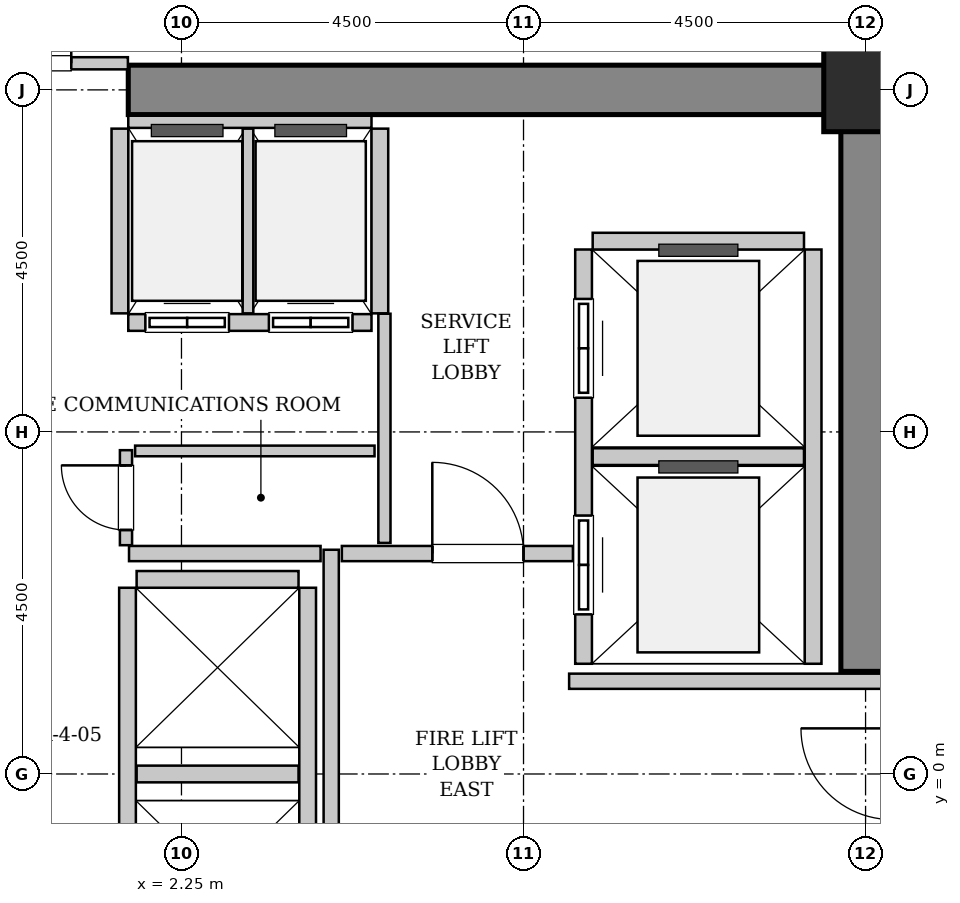
"""IFC4 building model, lengths in metres.
Left out: names, types, materials, properties, quantities, classifications, styles, units other than length and angle.
Written with IfcOpenShell. Run it as: python <this file> out.ifc"""

import sys

from ifc_helpers import new_model, si_unit, direction, frame, frame_2d, origin, origin_2d, place, context, subcontext, project, spatial, rectangle, hollow_rectangle, extrude, source, transform, mapped, element, fill, save


model = new_model("IFC4")
c1 = context("Model", 3, precision=1e-05, world=origin(), true_north=direction((0.0, 1.0)))
c2 = subcontext(c1, "Body", "Model", "MODEL_VIEW")
j1 = project(units=[si_unit("LENGTHUNIT", "METRE"), si_unit("PLANEANGLEUNIT", "RADIAN")], contexts=[c1])
p1 = place(None, origin())
s1 = spatial("IfcSite", under=j1, at=p1, CompositionType="ELEMENT")
p2 = place(p1, origin())
s2 = spatial("IfcBuilding", under=s1, at=p2, CompositionType="ELEMENT")
p3 = place(p2, frame((0.0, 0.0, 27.6)))
s3 = spatial("IfcBuildingStorey", under=s2, at=p3, CompositionType="ELEMENT", Elevation=27.6)
m1 = source(origin(), c2, "Body", "SweptSolid", [
    extrude(rectangle(XDim=10.025, YDim=0.65, at=frame_2d((5.012, 0.0))), origin(), (0.0, 0.0, 1.0), 5.4),
])
p4 = place(p3, frame((1.55, 9.0, 0.0), z_axis=(0.0, 0.0, 1.0), x_axis=(1.0, 0.0, 0.0)))
e1 = element("IfcWall", 1, at=p4, inside=s3, PredefinedType="SHEAR", context=c2, shape_type="MappedRepresentation", body=[
    mapped(m1, transform((0.0, 0.0, 0.0), x_axis=(1.0, 0.0, 0.0), y_axis=(0.0, 1.0, 0.0), z_axis=(0.0, 0.0, 1.0), scale=1.0)),
])
m2 = source(origin(), c2, "Body", "SweptSolid", [
    extrude(rectangle(XDim=7.325, YDim=0.65, at=frame_2d((3.663, 0.0))), origin(), (0.0, 0.0, 1.0), 5.4),
])
p5 = place(p3, frame((11.25, 1.35, 0.0), z_axis=(0.0, 0.0, 1.0), x_axis=(0.0, 1.0, 0.0)))
e2 = element("IfcWall", 2, at=p5, inside=s3, PredefinedType="SHEAR", context=c2, shape_type="MappedRepresentation", body=[
    mapped(m2, transform((0.0, 0.0, 0.0), x_axis=(1.0, 0.0, 0.0), y_axis=(0.0, 1.0, 0.0), z_axis=(0.0, 0.0, 1.0), scale=1.0)),
])
m3 = source(origin(), c2, "Body", "SweptSolid", [
    extrude(hollow_rectangle(XDim=1.1, YDim=1.1, WallThickness=0.055, InnerFilletRadius=0.055, OuterFilletRadius=0.11, at=origin_2d()), origin(), (0.0, 0.0, 1.0), 5.4),
])
p6 = place(p3, frame((11.25, 9.0, 0.0), z_axis=(0.0, 0.0, 1.0), x_axis=(1.0, 0.0, 0.0)))
e3 = element("IfcColumn", 3, at=p6, inside=s3, PredefinedType="COLUMN", context=c2, shape_type="MappedRepresentation", body=[
    mapped(m3, transform((0.0, 0.0, 0.0), x_axis=(1.0, 0.0, 0.0), y_axis=(0.0, 1.0, 0.0), z_axis=(0.0, 0.0, 1.0), scale=1.0)),
])
m4 = source(origin(), c2, "Body", "SweptSolid", [
    extrude(rectangle(XDim=5.45, YDim=0.22, at=frame_2d((2.725, 0.0))), origin(), (0.0, 0.0, 1.0), 5.135),
])
p7 = place(p3, frame((7.54, 6.9, 0.0), z_axis=(0.0, 0.0, 1.0), x_axis=(0.0, -1.0, 0.0)))
e4 = element("IfcWall", 4, at=p7, inside=s3, PredefinedType="SOLIDWALL", context=c2, shape_type="MappedRepresentation", body=[
    mapped(m4, transform((0.0, 0.0, 0.0), x_axis=(1.0, 0.0, 0.0), y_axis=(0.0, 1.0, 0.0), z_axis=(0.0, 0.0, 1.0), scale=1.0)),
])
p8 = place(p7, frame((3.5, 0.0, 0.0)))
e5 = element("IfcOpeningElement", 5, at=p8, cuts=e4, PredefinedType="OPENING", context=c2, shape_type="SweptSolid", body=[
    extrude(rectangle(XDim=1.3, YDim=2.3, at=frame_2d((0.65, 1.15))), frame((0.0, 0.12, 0.0), z_axis=(0.0, -1.0, 0.0), x_axis=(1.0, 0.0, 0.0)), (0.0, 0.0, 1.0), 0.24),
])
p9 = place(p7, frame((0.65, 0.0, 0.0)))
e6 = element("IfcOpeningElement", 6, at=p9, cuts=e4, PredefinedType="OPENING", context=c2, shape_type="SweptSolid", body=[
    extrude(rectangle(XDim=1.3, YDim=2.3, at=frame_2d((0.65, 1.15))), frame((0.0, 0.12, 0.0), z_axis=(0.0, -1.0, 0.0), x_axis=(1.0, 0.0, 0.0)), (0.0, 0.0, 1.0), 0.24),
])
p10 = place(p3, frame((10.56, 1.45, 0.0), z_axis=(0.0, 0.0, 1.0), x_axis=(0.0, 1.0, 0.0)))
e7 = element("IfcWall", 7, at=p10, inside=s3, PredefinedType="SOLIDWALL", context=c2, shape_type="MappedRepresentation", body=[
    mapped(m4, transform((0.0, 0.0, 0.0), x_axis=(1.0, 0.0, 0.0), y_axis=(0.0, 1.0, 0.0), z_axis=(0.0, 0.0, 1.0), scale=1.0)),
])
m5 = source(origin(), c2, "Body", "SweptSolid", [
    extrude(rectangle(XDim=2.78, YDim=0.22, at=frame_2d((1.39, 0.0))), origin(), (0.0, 0.0, 1.0), 5.135),
])
for number, where, z_axis, x_axis in (
    (8, (7.66, 4.175, 0.0), (0.0, 0.0, 1.0), (1.0, 0.0, 0.0)),
    (9, (10.44, 7.01, 0.0), (0.0, 0.0, 1.0), (-1.0, 0.0, 0.0)),
):
    element("IfcWall", number, at=place(p3, frame(where, z_axis=z_axis, x_axis=x_axis)), inside=s3, PredefinedType="SOLIDWALL", context=c2, shape_type="MappedRepresentation", body=[
        mapped(m5, transform((0.0, 0.0, 0.0), x_axis=(1.0, 0.0, 0.0), y_axis=(0.0, 1.0, 0.0), z_axis=(0.0, 0.0, 1.0), scale=1.0)),
    ])
m6 = source(origin(), c2, "Body", "SweptSolid", [
    extrude(rectangle(XDim=3.2, YDim=0.22, at=frame_2d((1.6, 0.0))), origin(), (0.0, 0.0, 1.0), 5.135),
])
p11 = place(p3, frame((1.55, 5.94, 0.0), z_axis=(0.0, 0.0, 1.0), x_axis=(1.0, 0.0, 0.0)))
e10 = element("IfcWall", 10, at=p11, inside=s3, PredefinedType="SOLIDWALL", context=c2, shape_type="MappedRepresentation", body=[
    mapped(m6, transform((0.0, 0.0, 0.0), x_axis=(1.0, 0.0, 0.0), y_axis=(0.0, 1.0, 0.0), z_axis=(0.0, 0.0, 1.0), scale=1.0)),
])
p12 = place(p11, frame((0.225, 0.0, 0.0)))
e11 = element("IfcOpeningElement", 11, at=p12, cuts=e10, PredefinedType="OPENING", context=c2, shape_type="SweptSolid", body=[
    extrude(rectangle(XDim=1.1, YDim=2.2, at=frame_2d((0.55, 1.1))), frame((0.0, 0.12, 0.0), z_axis=(0.0, -1.0, 0.0), x_axis=(1.0, 0.0, 0.0)), (0.0, 0.0, 1.0), 0.24),
])
p13 = place(p11, frame((1.85, 0.0, 0.0)))
e12 = element("IfcOpeningElement", 12, at=p13, cuts=e10, PredefinedType="OPENING", context=c2, shape_type="SweptSolid", body=[
    extrude(rectangle(XDim=1.1, YDim=2.2, at=frame_2d((0.55, 1.1))), frame((0.0, 0.12, 0.0), z_axis=(0.0, -1.0, 0.0), x_axis=(1.0, 0.0, 0.0)), (0.0, 0.0, 1.0), 0.24),
])
m7 = source(origin(), c2, "Body", "SweptSolid", [
    extrude(rectangle(XDim=3.2, YDim=0.16, at=frame_2d((1.6, 0.0))), origin(), (0.0, 0.0, 1.0), 4.025),
])
p14 = place(p3, frame((4.75, 8.58, 0.0), z_axis=(0.0, 0.0, 1.0), x_axis=(-1.0, 0.0, 0.0)))
e13 = element("IfcWall", 13, at=p14, inside=s3, PredefinedType="PARTITIONING", context=c2, shape_type="MappedRepresentation", body=[
    mapped(m7, transform((0.0, 0.0, 0.0), x_axis=(1.0, 0.0, 0.0), y_axis=(0.0, 1.0, 0.0), z_axis=(0.0, 0.0, 1.0), scale=1.0)),
])
m8 = source(origin(), c2, "Body", "SweptSolid", [
    extrude(rectangle(XDim=2.43, YDim=0.22, at=frame_2d((1.215, 0.0))), origin(), (0.0, 0.0, 1.0), 5.135),
])
p15 = place(p3, frame((1.44, 8.49, 0.0), z_axis=(0.0, 0.0, 1.0), x_axis=(0.0, -1.0, 0.0)))
e14 = element("IfcWall", 14, at=p15, inside=s3, PredefinedType="SOLIDWALL", context=c2, shape_type="MappedRepresentation", body=[
    mapped(m8, transform((0.0, 0.0, 0.0), x_axis=(1.0, 0.0, 0.0), y_axis=(0.0, 1.0, 0.0), z_axis=(0.0, 0.0, 1.0), scale=1.0)),
])
m9 = source(origin(), c2, "Body", "SweptSolid", [
    extrude(rectangle(XDim=2.43, YDim=0.14, at=frame_2d((1.215, 0.0))), origin(), (0.0, 0.0, 1.0), 5.135),
])
p16 = place(p3, frame((3.125, 6.06, 0.0), z_axis=(0.0, 0.0, 1.0), x_axis=(0.0, 1.0, 0.0)))
e15 = element("IfcWall", 15, at=p16, inside=s3, PredefinedType="PARTITIONING", context=c2, shape_type="MappedRepresentation", body=[
    mapped(m9, transform((0.0, 0.0, 0.0), x_axis=(1.0, 0.0, 0.0), y_axis=(0.0, 1.0, 0.0), z_axis=(0.0, 0.0, 1.0), scale=1.0)),
])
p17 = place(p3, frame((4.86, 6.06, 0.0), z_axis=(0.0, 0.0, 1.0), x_axis=(0.0, 1.0, 0.0)))
e16 = element("IfcWall", 16, at=p17, inside=s3, PredefinedType="SOLIDWALL", context=c2, shape_type="MappedRepresentation", body=[
    mapped(m8, transform((0.0, 0.0, 0.0), x_axis=(1.0, 0.0, 0.0), y_axis=(0.0, 1.0, 0.0), z_axis=(0.0, 0.0, 1.0), scale=1.0)),
])
m10 = source(origin(), c2, "Body", "SweptSolid", [
    extrude(rectangle(XDim=4.9, YDim=0.22, at=frame_2d((2.45, 0.0))), origin(), (0.0, 0.0, 1.0), 5.135),
])
for number, where, z_axis, x_axis in (
    (17, (1.54, 2.45, 0.0), (0.0, 0.0, 1.0), (0.0, -1.0, 0.0)),
    (18, (3.91, -2.45, 0.0), (0.0, 0.0, 1.0), (0.0, 1.0, 0.0)),
):
    element("IfcWall", number, at=place(p3, frame(where, z_axis=z_axis, x_axis=x_axis)), inside=s3, PredefinedType="SOLIDWALL", context=c2, shape_type="MappedRepresentation", body=[
        mapped(m10, transform((0.0, 0.0, 0.0), x_axis=(1.0, 0.0, 0.0), y_axis=(0.0, 1.0, 0.0), z_axis=(0.0, 0.0, 1.0), scale=1.0)),
    ])
m11 = source(origin(), c2, "Body", "SweptSolid", [
    extrude(rectangle(XDim=2.13, YDim=0.22, at=frame_2d((1.065, 0.0))), origin(), (0.0, 0.0, 1.0), 5.135),
])
for number, where, z_axis, x_axis in (
    (19, (1.66, 0.0, 0.0), (0.0, 0.0, 1.0), (1.0, 0.0, 0.0)),
    (20, (3.79, 2.56, 0.0), (0.0, 0.0, 1.0), (-1.0, 0.0, 0.0)),
):
    element("IfcWall", number, at=place(p3, frame(where, z_axis=z_axis, x_axis=x_axis)), inside=s3, PredefinedType="SOLIDWALL", context=c2, shape_type="MappedRepresentation", body=[
        mapped(m11, transform((0.0, 0.0, 0.0), x_axis=(1.0, 0.0, 0.0), y_axis=(0.0, 1.0, 0.0), z_axis=(0.0, 0.0, 1.0), scale=1.0)),
    ])
m12 = source(origin(), c2, "Body", "SweptSolid", [
    extrude(rectangle(XDim=5.9, YDim=0.2, at=frame_2d((2.95, 0.0))), origin(), (0.0, 0.0, 1.0), 5.135),
])
p18 = place(p3, frame((4.22, -2.95, 0.0), z_axis=(0.0, 0.0, 1.0), x_axis=(0.0, 1.0, 0.0)))
e21 = element("IfcWall", 21, at=p18, inside=s3, PredefinedType="PARTITIONING", context=c2, shape_type="MappedRepresentation", body=[
    mapped(m12, transform((0.0, 0.0, 0.0), x_axis=(1.0, 0.0, 0.0), y_axis=(0.0, 1.0, 0.0), z_axis=(0.0, 0.0, 1.0), scale=1.0)),
])
m13 = source(origin(), c2, "Body", "SweptSolid", [
    extrude(rectangle(XDim=2.52, YDim=0.2, at=frame_2d((1.26, 0.0))), origin(), (0.0, 0.0, 1.0), 5.135),
])
p19 = place(p3, frame((1.56, 2.9, 0.0), z_axis=(0.0, 0.0, 1.0), x_axis=(1.0, 0.0, 0.0)))
e22 = element("IfcWall", 22, at=p19, inside=s3, PredefinedType="PARTITIONING", context=c2, shape_type="MappedRepresentation", body=[
    mapped(m13, transform((0.0, 0.0, 0.0), x_axis=(1.0, 0.0, 0.0), y_axis=(0.0, 1.0, 0.0), z_axis=(0.0, 0.0, 1.0), scale=1.0)),
])
m14 = source(origin(), c2, "Body", "SweptSolid", [
    extrude(rectangle(XDim=3.04, YDim=0.2, at=frame_2d((1.52, 0.0))), origin(), (0.0, 0.0, 1.0), 5.135),
])
p20 = place(p3, frame((4.36, 2.9, 0.0), z_axis=(0.0, 0.0, 1.0), x_axis=(1.0, 0.0, 0.0)))
e23 = element("IfcWall", 23, at=p20, inside=s3, PredefinedType="PARTITIONING", context=c2, shape_type="MappedRepresentation", body=[
    mapped(m14, transform((0.0, 0.0, 0.0), x_axis=(1.0, 0.0, 0.0), y_axis=(0.0, 1.0, 0.0), z_axis=(0.0, 0.0, 1.0), scale=1.0)),
])
p21 = place(p20, frame((1.19, 0.0, 0.0)))
e24 = element("IfcOpeningElement", 24, at=p21, cuts=e23, PredefinedType="OPENING", context=c2, shape_type="SweptSolid", body=[
    extrude(rectangle(XDim=1.2, YDim=2.15, at=frame_2d((0.6, 1.075))), frame((0.0, 0.11, 0.0), z_axis=(0.0, -1.0, 0.0), x_axis=(1.0, 0.0, 0.0)), (0.0, 0.0, 1.0), 0.22),
])
m15 = source(origin(), c2, "Body", "SweptSolid", [
    extrude(rectangle(XDim=4.11, YDim=0.2, at=frame_2d((2.055, 0.0))), origin(), (0.0, 0.0, 1.0), 5.135),
])
p22 = place(p3, frame((7.35, 1.22, 0.0), z_axis=(0.0, 0.0, 1.0), x_axis=(1.0, 0.0, 0.0)))
e25 = element("IfcWall", 25, at=p22, inside=s3, PredefinedType="PARTITIONING", context=c2, shape_type="MappedRepresentation", body=[
    mapped(m15, transform((0.0, 0.0, 0.0), x_axis=(1.0, 0.0, 0.0), y_axis=(0.0, 1.0, 0.0), z_axis=(0.0, 0.0, 1.0), scale=1.0)),
])
m16 = source(origin(), c2, "Body", "SweptSolid", [
    extrude(rectangle(XDim=3.09, YDim=0.16, at=frame_2d((1.545, 0.0))), origin(), (0.0, 0.0, 1.0), 4.025),
])
p23 = place(p3, frame((-1.545, 9.35, 0.0), z_axis=(0.0, 0.0, 1.0), x_axis=(1.0, 0.0, 0.0)))
e26 = element("IfcWall", 26, at=p23, inside=s3, PredefinedType="PARTITIONING", context=c2, shape_type="MappedRepresentation", body=[
    mapped(m16, transform((0.0, 0.0, 0.0), x_axis=(1.0, 0.0, 0.0), y_axis=(0.0, 1.0, 0.0), z_axis=(0.0, 0.0, 1.0), scale=1.0)),
])
p24 = place(p23, frame((0.745, 0.0, 0.0)))
e27 = element("IfcOpeningElement", 27, at=p24, cuts=e26, PredefinedType="OPENING", context=c2, shape_type="SweptSolid", body=[
    extrude(rectangle(XDim=1.6, YDim=2.3, at=frame_2d((0.8, 1.15))), frame((0.0, 0.09, 0.0), z_axis=(0.0, -1.0, 0.0), x_axis=(1.0, 0.0, 0.0)), (0.0, 0.0, 1.0), 0.18),
])
m17 = source(origin(), c2, "Body", "SweptSolid", [
    extrude(rectangle(XDim=3.015, YDim=0.16, at=frame_2d((1.507, 0.0))), origin(), (0.0, 0.0, 1.0), 5.135),
])
p25 = place(p3, frame((4.92, 3.04, 0.0), z_axis=(0.0, 0.0, 1.0), x_axis=(0.0, 1.0, 0.0)))
e28 = element("IfcWall", 28, at=p25, inside=s3, PredefinedType="PARTITIONING", context=c2, shape_type="MappedRepresentation", body=[
    mapped(m17, transform((0.0, 0.0, 0.0), x_axis=(1.0, 0.0, 0.0), y_axis=(0.0, 1.0, 0.0), z_axis=(0.0, 0.0, 1.0), scale=1.0)),
])
m18 = source(origin(), c2, "Body", "SweptSolid", [
    extrude(rectangle(XDim=1.25, YDim=0.16, at=frame_2d((0.625, 0.0))), origin(), (0.0, 0.0, 1.0), 5.135),
])
p26 = place(p3, frame((1.52, 3.01, 0.0), z_axis=(0.0, 0.0, 1.0), x_axis=(0.0, 1.0, 0.0)))
e29 = element("IfcWall", 29, at=p26, inside=s3, PredefinedType="PARTITIONING", context=c2, shape_type="MappedRepresentation", body=[
    mapped(m18, transform((0.0, 0.0, 0.0), x_axis=(1.0, 0.0, 0.0), y_axis=(0.0, 1.0, 0.0), z_axis=(0.0, 0.0, 1.0), scale=1.0)),
])
p27 = place(p26, frame((0.2, 0.0, 0.0)))
e30 = element("IfcOpeningElement", 30, at=p27, cuts=e29, PredefinedType="OPENING", context=c2, shape_type="SweptSolid", body=[
    extrude(rectangle(XDim=0.85, YDim=2.1, at=frame_2d((0.425, 1.05))), frame((0.0, 0.09, 0.0), z_axis=(0.0, -1.0, 0.0), x_axis=(1.0, 0.0, 0.0)), (0.0, 0.0, 1.0), 0.18),
])
m19 = source(origin(), c2, "Body", "SweptSolid", [
    extrude(rectangle(XDim=3.15, YDim=0.14, at=frame_2d((1.575, 0.0))), origin(), (0.0, 0.0, 1.0), 5.135),
])
p28 = place(p3, frame((1.64, 4.25, 0.0), z_axis=(0.0, 0.0, 1.0), x_axis=(1.0, 0.0, 0.0)))
e31 = element("IfcWall", 31, at=p28, inside=s3, PredefinedType="PARTITIONING", context=c2, shape_type="MappedRepresentation", body=[
    mapped(m19, transform((0.0, 0.0, 0.0), x_axis=(1.0, 0.0, 0.0), y_axis=(0.0, 1.0, 0.0), z_axis=(0.0, 0.0, 1.0), scale=1.0)),
])
m20 = source(origin(), c2, "Body", "SweptSolid", [
    extrude(rectangle(XDim=1.3, YDim=2.3, at=frame_2d((0.65, 1.15))), frame((0.0, 0.025, 0.0), z_axis=(0.0, -1.0, 0.0), x_axis=(1.0, 0.0, 0.0)), (0.0, 0.0, 1.0), 0.05),
])
p29 = place(p8, origin())
e32 = element("IfcDoor", 32, at=p29, inside=s3, OperationType="SLIDING_TO_RIGHT", PredefinedType="DOOR", context=c2, shape_type="MappedRepresentation", body=[
    mapped(m20, transform((0.0, 0.0, 0.0), x_axis=(1.0, 0.0, 0.0), y_axis=(0.0, 1.0, 0.0), z_axis=(0.0, 0.0, 1.0), scale=1.0)),
])
fill(e5, e32)
p30 = place(p9, origin())
e33 = element("IfcDoor", 33, at=p30, inside=s3, OperationType="SLIDING_TO_RIGHT", PredefinedType="DOOR", context=c2, shape_type="MappedRepresentation", body=[
    mapped(m20, transform((0.0, 0.0, 0.0), x_axis=(1.0, 0.0, 0.0), y_axis=(0.0, 1.0, 0.0), z_axis=(0.0, 0.0, 1.0), scale=1.0)),
])
fill(e6, e33)
m21 = source(origin(), c2, "Body", "SweptSolid", [
    extrude(rectangle(XDim=1.1, YDim=2.2, at=frame_2d((0.55, 1.1))), frame((0.0, 0.025, 0.0), z_axis=(0.0, -1.0, 0.0), x_axis=(1.0, 0.0, 0.0)), (0.0, 0.0, 1.0), 0.05),
])
p31 = place(p12, origin())
e34 = element("IfcDoor", 34, at=p31, inside=s3, OperationType="DOUBLE_DOOR_SLIDING", PredefinedType="DOOR", context=c2, shape_type="MappedRepresentation", body=[
    mapped(m21, transform((0.0, 0.0, 0.0), x_axis=(1.0, 0.0, 0.0), y_axis=(0.0, 1.0, 0.0), z_axis=(0.0, 0.0, 1.0), scale=1.0)),
])
fill(e11, e34)
p32 = place(p13, origin())
e35 = element("IfcDoor", 35, at=p32, inside=s3, OperationType="DOUBLE_DOOR_SLIDING", PredefinedType="DOOR", context=c2, shape_type="MappedRepresentation", body=[
    mapped(m21, transform((0.0, 0.0, 0.0), x_axis=(1.0, 0.0, 0.0), y_axis=(0.0, 1.0, 0.0), z_axis=(0.0, 0.0, 1.0), scale=1.0)),
])
fill(e12, e35)
m22 = source(origin(), c2, "Body", "SweptSolid", [
    extrude(rectangle(XDim=1.2, YDim=2.15, at=frame_2d((0.6, 1.075))), frame((0.0, 0.025, 0.0), z_axis=(0.0, -1.0, 0.0), x_axis=(1.0, 0.0, 0.0)), (0.0, 0.0, 1.0), 0.05),
])
p33 = place(p21, origin())
e36 = element("IfcDoor", 36, at=p33, inside=s3, OperationType="SINGLE_SWING_LEFT", PredefinedType="DOOR", context=c2, shape_type="MappedRepresentation", body=[
    mapped(m22, transform((0.0, 0.0, 0.0), x_axis=(1.0, 0.0, 0.0), y_axis=(0.0, 1.0, 0.0), z_axis=(0.0, 0.0, 1.0), scale=1.0)),
])
fill(e24, e36)
m23 = source(origin(), c2, "Body", "SweptSolid", [
    extrude(rectangle(XDim=1.6, YDim=2.3, at=frame_2d((0.8, 1.15))), frame((0.0, 0.025, 0.0), z_axis=(0.0, -1.0, 0.0), x_axis=(1.0, 0.0, 0.0)), (0.0, 0.0, 1.0), 0.05),
])
p34 = place(p24, origin())
e37 = element("IfcDoor", 37, at=p34, inside=s3, OperationType="DOUBLE_DOOR_SINGLE_SWING", PredefinedType="DOOR", context=c2, shape_type="MappedRepresentation", body=[
    mapped(m23, transform((0.0, 0.0, 0.0), x_axis=(1.0, 0.0, 0.0), y_axis=(0.0, 1.0, 0.0), z_axis=(0.0, 0.0, 1.0), scale=1.0)),
])
fill(e27, e37)
m24 = source(origin(), c2, "Body", "SweptSolid", [
    extrude(rectangle(XDim=0.85, YDim=2.1, at=frame_2d((0.425, 1.05))), frame((0.0, 0.025, 0.0), z_axis=(0.0, -1.0, 0.0), x_axis=(1.0, 0.0, 0.0)), (0.0, 0.0, 1.0), 0.05),
])
p35 = place(p27, origin())
e38 = element("IfcDoor", 38, at=p35, inside=s3, OperationType="SINGLE_SWING_RIGHT", PredefinedType="DOOR", context=c2, shape_type="MappedRepresentation", body=[
    mapped(m24, transform((0.0, 0.0, 0.0), x_axis=(1.0, 0.0, 0.0), y_axis=(0.0, 1.0, 0.0), z_axis=(0.0, 0.0, 1.0), scale=1.0)),
])
fill(e30, e38)
save(model, sys.argv[1])
